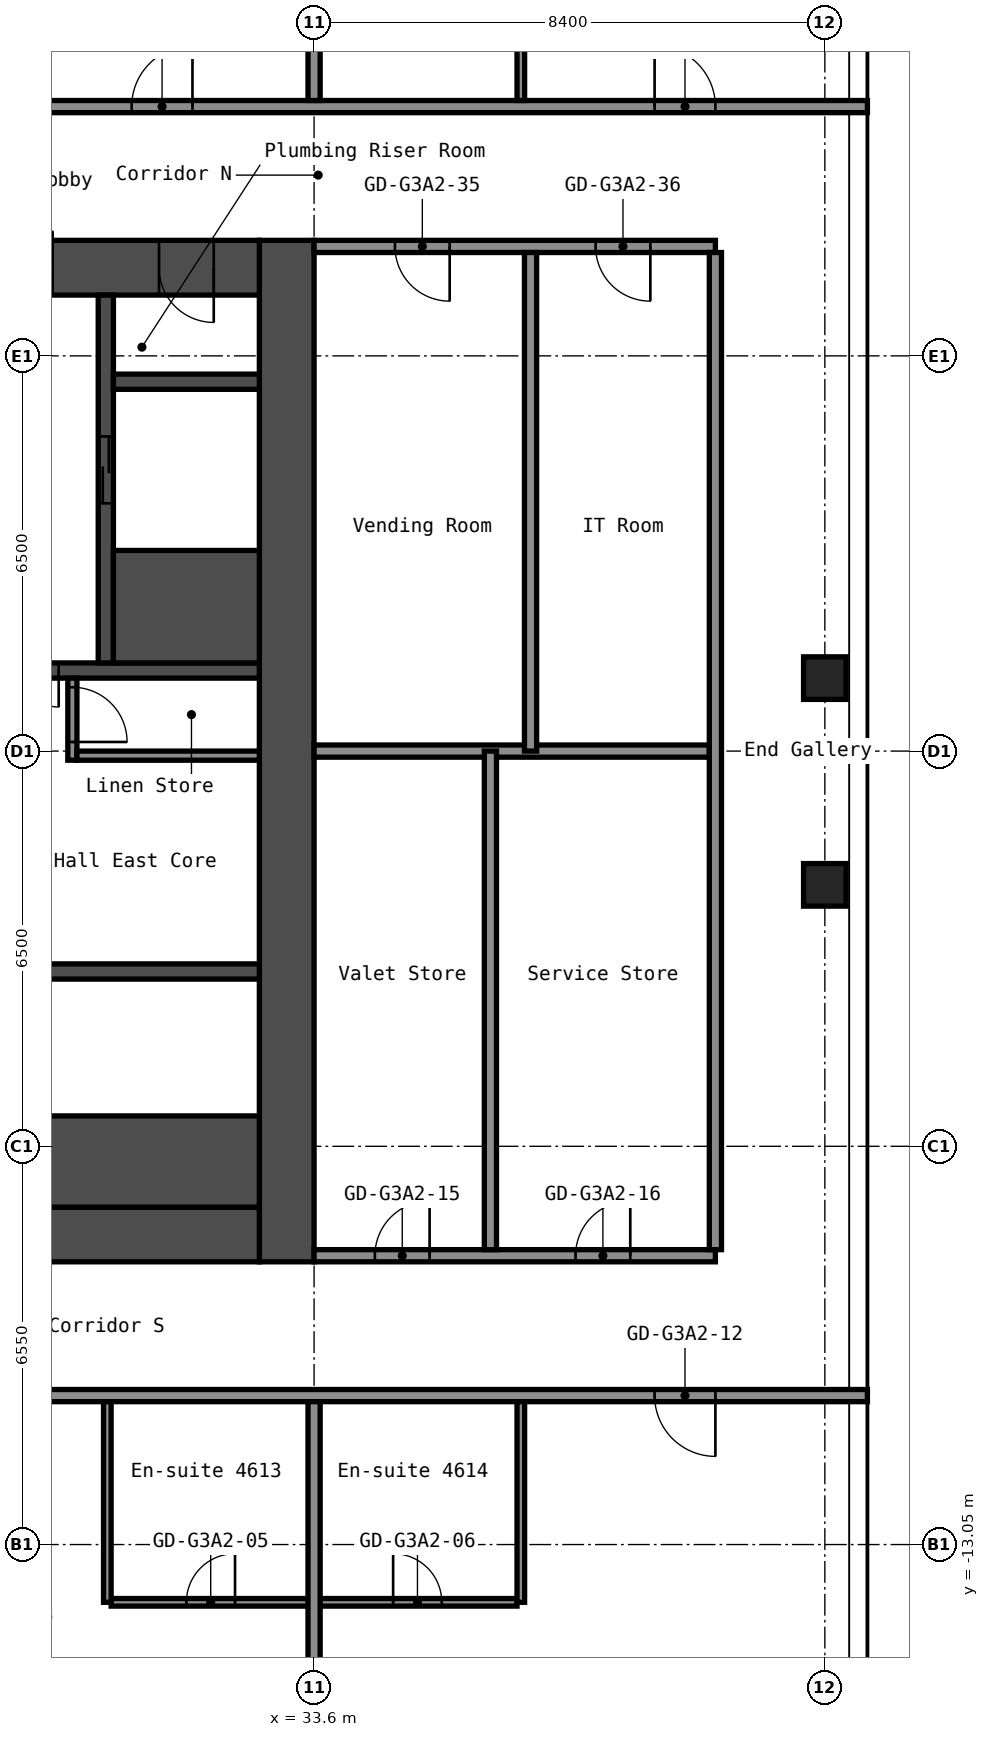
"""IFC4 building model, lengths in metres.
Left out: names, types, materials, properties, quantities, classifications, styles, units other than length and angle.
Written with IfcOpenShell. Run it as: python <this file> out.ifc"""

import sys

from ifc_helpers import new_model, si_unit, direction, frame, frame_2d, origin, origin_2d, place, context, subcontext, project, spatial, rectangle, hollow_rectangle, extrude, element, fill, save


model = new_model("IFC4")
c1 = context("Model", 3, precision=1e-05, world=origin(), true_north=direction((0.0, 1.0)))
c2 = subcontext(c1, "Body", "Model", "MODEL_VIEW")
j1 = project(units=[si_unit("LENGTHUNIT", "METRE"), si_unit("PLANEANGLEUNIT", "RADIAN")], contexts=[c1])
p1 = place(None, origin())
s1 = spatial("IfcSite", under=j1, at=p1, CompositionType="ELEMENT")
p2 = place(p1, origin())
s2 = spatial("IfcBuilding", under=s1, at=p2, CompositionType="ELEMENT")
p3 = place(p2, frame((0.0, 0.0, 163.0)))
s3 = spatial("IfcBuildingStorey", under=s2, at=p3, CompositionType="ELEMENT", Elevation=163.0)
for number, where, z_axis, x_axis in (
    (1, (42.0, -2.2, 0.0), (0.0, 0.0, 1.0), (1.0, 0.0, 0.0)),
    (2, (42.0, 1.2, 0.0), (0.0, 0.0, 1.0), (1.0, 0.0, 0.0)),
):
    element("IfcColumn", number, at=place(p3, frame(where, z_axis=z_axis, x_axis=x_axis)), inside=s3, PredefinedType="COLUMN", context=c2, shape_type="SweptSolid", body=[
        extrude(hollow_rectangle(XDim=0.7, YDim=0.7, WallThickness=0.028, at=origin_2d()), origin(), (0.0, 0.0, 1.0), 2.75),
    ])
p4 = place(p3, frame((33.15, -8.4, 0.0), z_axis=(0.0, 0.0, 1.0), x_axis=(0.0, 1.0, 0.0)))
e3 = element("IfcWall", 3, at=p4, inside=s3, PredefinedType="SHEAR", context=c2, shape_type="SweptSolid", body=[
    extrude(rectangle(XDim=16.8, YDim=0.9, at=frame_2d((8.4, 0.0))), origin(), (0.0, 0.0, 1.0), 2.75),
])
p5 = place(p3, frame((17.7, 7.95, 0.0), z_axis=(0.0, 0.0, 1.0), x_axis=(1.0, 0.0, 0.0)))
e4 = element("IfcWall", 4, at=p5, inside=s3, PredefinedType="SHEAR", context=c2, shape_type="SweptSolid", body=[
    extrude(rectangle(XDim=15.0, YDim=0.9, at=frame_2d((7.5, 0.0))), origin(), (0.0, 0.0, 1.0), 2.75),
])
p6 = place(p5, frame((10.4, 0.0, 0.0)))
e5 = element("IfcOpeningElement", 5, at=p6, cuts=e4, PredefinedType="OPENING", context=c2, shape_type="SweptSolid", body=[
    extrude(rectangle(XDim=1.2, YDim=2.1, at=frame_2d((0.6, 1.05))), frame((0.0, 0.46, 0.0), z_axis=(0.0, -1.0, 0.0), x_axis=(1.0, 0.0, 0.0)), (0.0, 0.0, 1.0), 0.92),
])
p7 = place(p5, frame((13.35, 0.0, 0.0)))
e6 = element("IfcOpeningElement", 6, at=p7, cuts=e4, PredefinedType="OPENING", context=c2, shape_type="SweptSolid", body=[
    extrude(rectangle(XDim=0.9, YDim=2.1, at=frame_2d((0.45, 1.05))), frame((0.0, 0.46, 0.0), z_axis=(0.0, -1.0, 0.0), x_axis=(1.0, 0.0, 0.0)), (0.0, 0.0, 1.0), 0.92),
])
p8 = place(p3, frame((17.7, -7.95, 0.0), z_axis=(0.0, 0.0, 1.0), x_axis=(1.0, 0.0, 0.0)))
e7 = element("IfcWall", 7, at=p8, inside=s3, PredefinedType="SHEAR", context=c2, shape_type="SweptSolid", body=[
    extrude(rectangle(XDim=15.0, YDim=0.9, at=frame_2d((7.5, 0.0))), origin(), (0.0, 0.0, 1.0), 2.75),
])
p9 = place(p8, frame((2.55, 0.0, 0.0)))
e8 = element("IfcOpeningElement", 8, at=p9, cuts=e7, PredefinedType="OPENING", context=c2, shape_type="SweptSolid", body=[
    extrude(rectangle(XDim=1.0, YDim=2.1, at=frame_2d((0.5, 1.05))), frame((0.0, 0.46, 0.0), z_axis=(0.0, -1.0, 0.0), x_axis=(1.0, 0.0, 0.0)), (0.0, 0.0, 1.0), 0.92),
])
p10 = place(p3, frame((27.65, 1.325, 0.0), z_axis=(0.0, 0.0, 1.0), x_axis=(1.0, 0.0, 0.0)))
e9 = element("IfcWall", 9, at=p10, inside=s3, PredefinedType="SHEAR", context=c2, shape_type="SweptSolid", body=[
    extrude(rectangle(XDim=5.05, YDim=0.25, at=frame_2d((2.525, 0.0))), origin(), (0.0, 0.0, 1.0), 2.75),
])
p11 = place(p10, frame((0.55, 0.0, 0.0)))
e10 = element("IfcOpeningElement", 10, at=p11, cuts=e9, PredefinedType="OPENING", context=c2, shape_type="SweptSolid", body=[
    extrude(rectangle(XDim=1.2, YDim=2.1, at=frame_2d((0.6, 1.05))), frame((0.0, 0.135, 0.0), z_axis=(0.0, -1.0, 0.0), x_axis=(1.0, 0.0, 0.0)), (0.0, 0.0, 1.0), 0.27),
])
p12 = place(p3, frame((30.175, 1.45, 0.0), z_axis=(0.0, 0.0, 1.0), x_axis=(0.0, 1.0, 0.0)))
e11 = element("IfcWall", 11, at=p12, inside=s3, PredefinedType="SHEAR", context=c2, shape_type="SweptSolid", body=[
    extrude(rectangle(XDim=6.05, YDim=0.25, at=frame_2d((3.025, 0.0))), origin(), (0.0, 0.0, 1.0), 2.75),
])
p13 = place(p12, frame((2.625, 0.0, 0.0)))
e12 = element("IfcOpeningElement", 12, at=p13, cuts=e11, PredefinedType="OPENING", context=c2, shape_type="SweptSolid", body=[
    extrude(rectangle(XDim=1.1, YDim=2.1, at=frame_2d((0.55, 1.05))), frame((0.0, 0.135, 0.0), z_axis=(0.0, -1.0, 0.0), x_axis=(1.0, 0.0, 0.0)), (0.0, 0.0, 1.0), 0.27),
])
p14 = place(p3, frame((30.3, 2.375, 0.0), z_axis=(0.0, 0.0, 1.0), x_axis=(1.0, 0.0, 0.0)))
e13 = element("IfcWall", 13, at=p14, inside=s3, PredefinedType="SHEAR", context=c2, shape_type="SweptSolid", body=[
    extrude(rectangle(XDim=2.4, YDim=1.85, at=frame_2d((1.2, 0.0))), origin(), (0.0, 0.0, 1.0), 2.75),
])
p15 = place(p3, frame((30.3, 6.075, 0.0), z_axis=(0.0, 0.0, 1.0), x_axis=(1.0, 0.0, 0.0)))
e14 = element("IfcWall", 14, at=p15, inside=s3, PredefinedType="SHEAR", context=c2, shape_type="SweptSolid", body=[
    extrude(rectangle(XDim=2.4, YDim=0.25, at=frame_2d((1.2, 0.0))), origin(), (0.0, 0.0, 1.0), 2.75),
])
p16 = place(p3, frame((28.15, -3.625, 0.0), z_axis=(0.0, 0.0, 1.0), x_axis=(1.0, 0.0, 0.0)))
e15 = element("IfcWall", 15, at=p16, inside=s3, PredefinedType="SHEAR", context=c2, shape_type="SweptSolid", body=[
    extrude(rectangle(XDim=4.55, YDim=0.25, at=frame_2d((2.275, 0.0))), origin(), (0.0, 0.0, 1.0), 2.75),
])
p17 = place(p3, frame((28.15, -6.75, 0.0), z_axis=(0.0, 0.0, 1.0), x_axis=(1.0, 0.0, 0.0)))
e16 = element("IfcWall", 16, at=p17, inside=s3, PredefinedType="SHEAR", context=c2, shape_type="SweptSolid", body=[
    extrude(rectangle(XDim=4.55, YDim=1.5, at=frame_2d((2.275, 0.0))), origin(), (0.0, 0.0, 1.0), 2.75),
])
p18 = place(p3, frame((29.625, -0.15, 0.0), z_axis=(0.0, 0.0, 1.0), x_axis=(0.0, 1.0, 0.0)))
e17 = element("IfcWall", 17, at=p18, inside=s3, PredefinedType="PARTITIONING", context=c2, shape_type="SweptSolid", body=[
    extrude(rectangle(XDim=1.35, YDim=0.15, at=frame_2d((0.675, 0.0))), origin(), (0.0, 0.0, 1.0), 2.75),
])
p19 = place(p18, frame((0.3, 0.0, 0.0)))
e18 = element("IfcOpeningElement", 18, at=p19, cuts=e17, PredefinedType="OPENING", context=c2, shape_type="SweptSolid", body=[
    extrude(rectangle(XDim=0.9, YDim=2.1, at=frame_2d((0.45, 1.05))), frame((0.0, 0.085, 0.0), z_axis=(0.0, -1.0, 0.0), x_axis=(1.0, 0.0, 0.0)), (0.0, 0.0, 1.0), 0.17),
])
p20 = place(p3, frame((29.7, -0.075, 0.0), z_axis=(0.0, 0.0, 1.0), x_axis=(1.0, 0.0, 0.0)))
e19 = element("IfcWall", 19, at=p20, inside=s3, PredefinedType="PARTITIONING", context=c2, shape_type="SweptSolid", body=[
    extrude(rectangle(XDim=3.0, YDim=0.15, at=frame_2d((1.5, 0.0))), origin(), (0.0, 0.0, 1.0), 2.75),
])
p21 = place(p3, frame((30.262, -14.0, 0.0), z_axis=(0.0, 0.0, 1.0), x_axis=(1.0, 0.0, 0.0)))
e20 = element("IfcWall", 20, at=p21, inside=s3, PredefinedType="PARTITIONING", context=c2, shape_type="SweptSolid", body=[
    extrude(rectangle(XDim=6.675, YDim=0.125, at=frame_2d((3.337, 0.0))), origin(), (0.0, 0.0, 1.0), 2.75),
])
p22 = place(p21, frame((1.238, 0.0, 0.0)))
e21 = element("IfcOpeningElement", 21, at=p22, cuts=e20, PredefinedType="OPENING", context=c2, shape_type="SweptSolid", body=[
    extrude(rectangle(XDim=0.8, YDim=2.1, at=frame_2d((0.4, 1.05))), frame((0.0, 0.073, 0.0), z_axis=(0.0, -1.0, 0.0), x_axis=(1.0, 0.0, 0.0)), (0.0, 0.0, 1.0), 0.145),
])
p23 = place(p21, frame((4.637, 0.0, 0.0)))
e22 = element("IfcOpeningElement", 22, at=p23, cuts=e20, PredefinedType="OPENING", context=c2, shape_type="SweptSolid", body=[
    extrude(rectangle(XDim=0.8, YDim=2.1, at=frame_2d((0.4, 1.05))), frame((0.0, 0.073, 0.0), z_axis=(0.0, -1.0, 0.0), x_axis=(1.0, 0.0, 0.0)), (0.0, 0.0, 1.0), 0.145),
])
p24 = place(p3, frame((16.8, -10.6, 0.0), z_axis=(0.0, 0.0, 1.0), x_axis=(1.0, 0.0, 0.0)))
e23 = element("IfcWall", 23, at=p24, inside=s3, PredefinedType="PARTITIONING", context=c2, shape_type="SweptSolid", body=[
    extrude(rectangle(XDim=25.9, YDim=0.2, at=frame_2d((12.95, 0.0))), origin(), (0.0, 0.0, 1.0), 2.75),
])
p25 = place(p24, frame((5.4, 0.0, 0.0)))
e24 = element("IfcOpeningElement", 24, at=p25, cuts=e23, PredefinedType="OPENING", context=c2, shape_type="SweptSolid", body=[
    extrude(rectangle(XDim=1.0, YDim=2.1, at=frame_2d((0.5, 1.05))), frame((0.0, 0.11, 0.0), z_axis=(0.0, -1.0, 0.0), x_axis=(1.0, 0.0, 0.0)), (0.0, 0.0, 1.0), 0.22),
])
p26 = place(p24, frame((10.4, 0.0, 0.0)))
e25 = element("IfcOpeningElement", 25, at=p26, cuts=e23, PredefinedType="OPENING", context=c2, shape_type="SweptSolid", body=[
    extrude(rectangle(XDim=1.0, YDim=2.1, at=frame_2d((0.5, 1.05))), frame((0.0, 0.11, 0.0), z_axis=(0.0, -1.0, 0.0), x_axis=(1.0, 0.0, 0.0)), (0.0, 0.0, 1.0), 0.22),
])
p27 = place(p24, frame((22.4, 0.0, 0.0)))
e26 = element("IfcOpeningElement", 26, at=p27, cuts=e23, PredefinedType="OPENING", context=c2, shape_type="SweptSolid", body=[
    extrude(rectangle(XDim=1.0, YDim=2.1, at=frame_2d((0.5, 1.05))), frame((0.0, 0.11, 0.0), z_axis=(0.0, -1.0, 0.0), x_axis=(1.0, 0.0, 0.0)), (0.0, 0.0, 1.0), 0.22),
])
p28 = place(p3, frame((33.6, -8.3, 0.0), z_axis=(0.0, 0.0, 1.0), x_axis=(1.0, 0.0, 0.0)))
e27 = element("IfcWall", 27, at=p28, inside=s3, PredefinedType="PARTITIONING", context=c2, shape_type="SweptSolid", body=[
    extrude(rectangle(XDim=6.6, YDim=0.2, at=frame_2d((3.3, 0.0))), origin(), (0.0, 0.0, 1.0), 2.75),
])
p29 = place(p28, frame((1.0, 0.0, 0.0)))
e28 = element("IfcOpeningElement", 28, at=p29, cuts=e27, PredefinedType="OPENING", context=c2, shape_type="SweptSolid", body=[
    extrude(rectangle(XDim=0.9, YDim=2.1, at=frame_2d((0.45, 1.05))), frame((0.0, 0.11, 0.0), z_axis=(0.0, -1.0, 0.0), x_axis=(1.0, 0.0, 0.0)), (0.0, 0.0, 1.0), 0.22),
])
p30 = place(p28, frame((4.3, 0.0, 0.0)))
e29 = element("IfcOpeningElement", 29, at=p30, cuts=e27, PredefinedType="OPENING", context=c2, shape_type="SweptSolid", body=[
    extrude(rectangle(XDim=0.9, YDim=2.1, at=frame_2d((0.45, 1.05))), frame((0.0, 0.11, 0.0), z_axis=(0.0, -1.0, 0.0), x_axis=(1.0, 0.0, 0.0)), (0.0, 0.0, 1.0), 0.22),
])
p31 = place(p3, frame((33.6, 0.0, 0.0), z_axis=(0.0, 0.0, 1.0), x_axis=(1.0, 0.0, 0.0)))
e30 = element("IfcWall", 30, at=p31, inside=s3, PredefinedType="PARTITIONING", context=c2, shape_type="SweptSolid", body=[
    extrude(rectangle(XDim=6.5, YDim=0.2, at=frame_2d((3.25, 0.0))), origin(), (0.0, 0.0, 1.0), 2.75),
])
p32 = place(p3, frame((33.6, 8.3, 0.0), z_axis=(0.0, 0.0, 1.0), x_axis=(1.0, 0.0, 0.0)))
e31 = element("IfcWall", 31, at=p32, inside=s3, PredefinedType="PARTITIONING", context=c2, shape_type="SweptSolid", body=[
    extrude(rectangle(XDim=6.6, YDim=0.2, at=frame_2d((3.3, 0.0))), origin(), (0.0, 0.0, 1.0), 2.75),
])
p33 = place(p32, frame((1.33, 0.0, 0.0)))
e32 = element("IfcOpeningElement", 32, at=p33, cuts=e31, PredefinedType="OPENING", context=c2, shape_type="SweptSolid", body=[
    extrude(rectangle(XDim=0.9, YDim=2.1, at=frame_2d((0.45, 1.05))), frame((0.0, 0.11, 0.0), z_axis=(0.0, -1.0, 0.0), x_axis=(1.0, 0.0, 0.0)), (0.0, 0.0, 1.0), 0.22),
])
p34 = place(p32, frame((4.63, 0.0, 0.0)))
e33 = element("IfcOpeningElement", 33, at=p34, cuts=e31, PredefinedType="OPENING", context=c2, shape_type="SweptSolid", body=[
    extrude(rectangle(XDim=0.9, YDim=2.1, at=frame_2d((0.45, 1.05))), frame((0.0, 0.11, 0.0), z_axis=(0.0, -1.0, 0.0), x_axis=(1.0, 0.0, 0.0)), (0.0, 0.0, 1.0), 0.22),
])
p35 = place(p3, frame((16.8, 10.6, 0.0), z_axis=(0.0, 0.0, 1.0), x_axis=(1.0, 0.0, 0.0)))
e34 = element("IfcWall", 34, at=p35, inside=s3, PredefinedType="PARTITIONING", context=c2, shape_type="SweptSolid", body=[
    extrude(rectangle(XDim=25.9, YDim=0.2, at=frame_2d((12.95, 0.0))), origin(), (0.0, 0.0, 1.0), 2.75),
])
p36 = place(p35, frame((2.0, 0.0, 0.0)))
e35 = element("IfcOpeningElement", 35, at=p36, cuts=e34, PredefinedType="OPENING", context=c2, shape_type="SweptSolid", body=[
    extrude(rectangle(XDim=1.0, YDim=2.1, at=frame_2d((0.5, 1.05))), frame((0.0, 0.11, 0.0), z_axis=(0.0, -1.0, 0.0), x_axis=(1.0, 0.0, 0.0)), (0.0, 0.0, 1.0), 0.22),
])
p37 = place(p35, frame((13.8, 0.0, 0.0)))
e36 = element("IfcOpeningElement", 36, at=p37, cuts=e34, PredefinedType="OPENING", context=c2, shape_type="SweptSolid", body=[
    extrude(rectangle(XDim=1.0, YDim=2.1, at=frame_2d((0.5, 1.05))), frame((0.0, 0.11, 0.0), z_axis=(0.0, -1.0, 0.0), x_axis=(1.0, 0.0, 0.0)), (0.0, 0.0, 1.0), 0.22),
])
p38 = place(p35, frame((22.4, 0.0, 0.0)))
e37 = element("IfcOpeningElement", 37, at=p38, cuts=e34, PredefinedType="OPENING", context=c2, shape_type="SweptSolid", body=[
    extrude(rectangle(XDim=1.0, YDim=2.1, at=frame_2d((0.5, 1.05))), frame((0.0, 0.11, 0.0), z_axis=(0.0, -1.0, 0.0), x_axis=(1.0, 0.0, 0.0)), (0.0, 0.0, 1.0), 0.22),
])
p39 = place(p3, frame((30.2, -14.0, 0.0), z_axis=(0.0, 0.0, 1.0), x_axis=(0.0, 1.0, 0.0)))
e38 = element("IfcWall", 38, at=p39, inside=s3, PredefinedType="PARTITIONING", context=c2, shape_type="SweptSolid", body=[
    extrude(rectangle(XDim=3.3, YDim=0.125, at=frame_2d((1.65, 0.0))), origin(), (0.0, 0.0, 1.0), 2.75),
])
p40 = place(p3, frame((33.6, -19.3, 0.0), z_axis=(0.0, 0.0, 1.0), x_axis=(0.0, 1.0, 0.0)))
e39 = element("IfcWall", 39, at=p40, inside=s3, PredefinedType="PARTITIONING", context=c2, shape_type="SweptSolid", body=[
    extrude(rectangle(XDim=8.6, YDim=0.2, at=frame_2d((4.3, 0.0))), origin(), (0.0, 0.0, 1.0), 2.75),
])
p41 = place(p3, frame((33.6, 10.7, 0.0), z_axis=(0.0, 0.0, 1.0), x_axis=(0.0, 1.0, 0.0)))
e40 = element("IfcWall", 40, at=p41, inside=s3, PredefinedType="PARTITIONING", context=c2, shape_type="SweptSolid", body=[
    extrude(rectangle(XDim=7.6, YDim=0.2, at=frame_2d((3.8, 0.0))), origin(), (0.0, 0.0, 1.0), 2.75),
])
p42 = place(p3, frame((36.5, -8.2, 0.0), z_axis=(0.0, 0.0, 1.0), x_axis=(0.0, 1.0, 0.0)))
e41 = element("IfcWall", 41, at=p42, inside=s3, PredefinedType="PARTITIONING", context=c2, shape_type="SweptSolid", body=[
    extrude(rectangle(XDim=8.2, YDim=0.2, at=frame_2d((4.1, 0.0))), origin(), (0.0, 0.0, 1.0), 2.75),
])
for number, where, z_axis, x_axis in (
    (42, (37.0, -14.0, 0.0), (0.0, 0.0, 1.0), (0.0, 1.0, 0.0)),
    (43, (37.0, 10.7, 0.0), (0.0, 0.0, 1.0), (0.0, 1.0, 0.0)),
):
    element("IfcWall", number, at=place(p3, frame(where, z_axis=z_axis, x_axis=x_axis)), inside=s3, PredefinedType="PARTITIONING", context=c2, shape_type="SweptSolid", body=[
        extrude(rectangle(XDim=3.3, YDim=0.125, at=frame_2d((1.65, 0.0))), origin(), (0.0, 0.0, 1.0), 2.75),
    ])
p43 = place(p3, frame((37.16, 0.0, 0.0), z_axis=(0.0, 0.0, 1.0), x_axis=(0.0, 1.0, 0.0)))
e44 = element("IfcWall", 44, at=p43, inside=s3, PredefinedType="PARTITIONING", context=c2, shape_type="SweptSolid", body=[
    extrude(rectangle(XDim=8.2, YDim=0.2, at=frame_2d((4.1, 0.0))), origin(), (0.0, 0.0, 1.0), 2.75),
])
p44 = place(p3, frame((40.2, -8.2, 0.0), z_axis=(0.0, 0.0, 1.0), x_axis=(0.0, 1.0, 0.0)))
e45 = element("IfcWall", 45, at=p44, inside=s3, PredefinedType="PARTITIONING", context=c2, shape_type="SweptSolid", body=[
    extrude(rectangle(XDim=16.4, YDim=0.2, at=frame_2d((8.2, 0.0))), origin(), (0.0, 0.0, 1.0), 2.75),
])
p45 = place(p7, origin())
e46 = element("IfcDoor", 46, at=p45, inside=s3, OperationType="SINGLE_SWING_RIGHT", PredefinedType="DOOR", context=c2, shape_type="SweptSolid", body=[
    extrude(rectangle(XDim=0.9, YDim=2.1, at=frame_2d((0.45, 1.05))), frame((0.0, 0.025, 0.0), z_axis=(0.0, -1.0, 0.0), x_axis=(1.0, 0.0, 0.0)), (0.0, 0.0, 1.0), 0.05),
])
fill(e6, e46)
p46 = place(p11, origin())
e47 = element("IfcDoor", 47, at=p46, inside=s3, OperationType="DOUBLE_DOOR_SINGLE_SWING", PredefinedType="DOOR", context=c2, shape_type="SweptSolid", body=[
    extrude(rectangle(XDim=1.2, YDim=2.1, at=frame_2d((0.6, 1.05))), frame((0.0, 0.025, 0.0), z_axis=(0.0, -1.0, 0.0), x_axis=(1.0, 0.0, 0.0)), (0.0, 0.0, 1.0), 0.05),
])
fill(e10, e47)
p47 = place(p19, origin())
e48 = element("IfcDoor", 48, at=p47, inside=s3, OperationType="SINGLE_SWING_LEFT", PredefinedType="DOOR", context=c2, shape_type="SweptSolid", body=[
    extrude(rectangle(XDim=0.9, YDim=2.1, at=frame_2d((0.45, 1.05))), frame((0.0, 0.025, 0.0), z_axis=(0.0, -1.0, 0.0), x_axis=(1.0, 0.0, 0.0)), (0.0, 0.0, 1.0), 0.05),
])
fill(e18, e48)
p48 = place(p13, origin())
e49 = element("IfcDoor", 49, at=p48, inside=s3, OperationType="DOUBLE_DOOR_SLIDING", PredefinedType="DOOR", context=c2, shape_type="SweptSolid", body=[
    extrude(rectangle(XDim=1.1, YDim=2.1, at=frame_2d((0.55, 1.05))), frame((0.0, 0.025, 0.0), z_axis=(0.0, -1.0, 0.0), x_axis=(1.0, 0.0, 0.0)), (0.0, 0.0, 1.0), 0.05),
])
fill(e12, e49)
p49 = place(p22, origin())
e50 = element("IfcDoor", 50, at=p49, inside=s3, OperationType="SINGLE_SWING_LEFT", PredefinedType="DOOR", context=c2, shape_type="SweptSolid", body=[
    extrude(rectangle(XDim=0.8, YDim=2.1, at=frame_2d((0.4, 1.05))), frame((0.0, 0.025, 0.0), z_axis=(0.0, -1.0, 0.0), x_axis=(1.0, 0.0, 0.0)), (0.0, 0.0, 1.0), 0.05),
])
fill(e21, e50)
p50 = place(p23, origin())
e51 = element("IfcDoor", 51, at=p50, inside=s3, OperationType="SINGLE_SWING_RIGHT", PredefinedType="DOOR", context=c2, shape_type="SweptSolid", body=[
    extrude(rectangle(XDim=0.8, YDim=2.1, at=frame_2d((0.4, 1.05))), frame((0.0, 0.025, 0.0), z_axis=(0.0, -1.0, 0.0), x_axis=(1.0, 0.0, 0.0)), (0.0, 0.0, 1.0), 0.05),
])
fill(e22, e51)
p51 = place(p27, origin())
e52 = element("IfcDoor", 52, at=p51, inside=s3, OperationType="SINGLE_SWING_RIGHT", PredefinedType="DOOR", context=c2, shape_type="SweptSolid", body=[
    extrude(rectangle(XDim=1.0, YDim=2.1, at=frame_2d((0.5, 1.05))), frame((0.0, 0.025, 0.0), z_axis=(0.0, -1.0, 0.0), x_axis=(1.0, 0.0, 0.0)), (0.0, 0.0, 1.0), 0.05),
])
fill(e26, e52)
p52 = place(p29, origin())
e53 = element("IfcDoor", 53, at=p52, inside=s3, OperationType="SINGLE_SWING_LEFT", PredefinedType="DOOR", context=c2, shape_type="SweptSolid", body=[
    extrude(rectangle(XDim=0.9, YDim=2.1, at=frame_2d((0.45, 1.05))), frame((0.0, 0.025, 0.0), z_axis=(0.0, -1.0, 0.0), x_axis=(1.0, 0.0, 0.0)), (0.0, 0.0, 1.0), 0.05),
])
fill(e28, e53)
p53 = place(p30, origin())
e54 = element("IfcDoor", 54, at=p53, inside=s3, OperationType="SINGLE_SWING_LEFT", PredefinedType="DOOR", context=c2, shape_type="SweptSolid", body=[
    extrude(rectangle(XDim=0.9, YDim=2.1, at=frame_2d((0.45, 1.05))), frame((0.0, 0.025, 0.0), z_axis=(0.0, -1.0, 0.0), x_axis=(1.0, 0.0, 0.0)), (0.0, 0.0, 1.0), 0.05),
])
fill(e29, e54)
p54 = place(p33, origin())
e55 = element("IfcDoor", 55, at=p54, inside=s3, OperationType="SINGLE_SWING_RIGHT", PredefinedType="DOOR", context=c2, shape_type="SweptSolid", body=[
    extrude(rectangle(XDim=0.9, YDim=2.1, at=frame_2d((0.45, 1.05))), frame((0.0, 0.025, 0.0), z_axis=(0.0, -1.0, 0.0), x_axis=(1.0, 0.0, 0.0)), (0.0, 0.0, 1.0), 0.05),
])
fill(e32, e55)
p55 = place(p34, origin())
e56 = element("IfcDoor", 56, at=p55, inside=s3, OperationType="SINGLE_SWING_RIGHT", PredefinedType="DOOR", context=c2, shape_type="SweptSolid", body=[
    extrude(rectangle(XDim=0.9, YDim=2.1, at=frame_2d((0.45, 1.05))), frame((0.0, 0.025, 0.0), z_axis=(0.0, -1.0, 0.0), x_axis=(1.0, 0.0, 0.0)), (0.0, 0.0, 1.0), 0.05),
])
fill(e33, e56)
p56 = place(p37, origin())
e57 = element("IfcDoor", 57, at=p56, inside=s3, OperationType="SINGLE_SWING_LEFT", PredefinedType="DOOR", context=c2, shape_type="SweptSolid", body=[
    extrude(rectangle(XDim=1.0, YDim=2.1, at=frame_2d((0.5, 1.05))), frame((0.0, 0.025, 0.0), z_axis=(0.0, -1.0, 0.0), x_axis=(1.0, 0.0, 0.0)), (0.0, 0.0, 1.0), 0.05),
])
fill(e36, e57)
p57 = place(p38, origin())
e58 = element("IfcDoor", 58, at=p57, inside=s3, OperationType="SINGLE_SWING_RIGHT", PredefinedType="DOOR", context=c2, shape_type="SweptSolid", body=[
    extrude(rectangle(XDim=1.0, YDim=2.1, at=frame_2d((0.5, 1.05))), frame((0.0, 0.025, 0.0), z_axis=(0.0, -1.0, 0.0), x_axis=(1.0, 0.0, 0.0)), (0.0, 0.0, 1.0), 0.05),
])
fill(e37, e58)
save(model, sys.argv[1])
